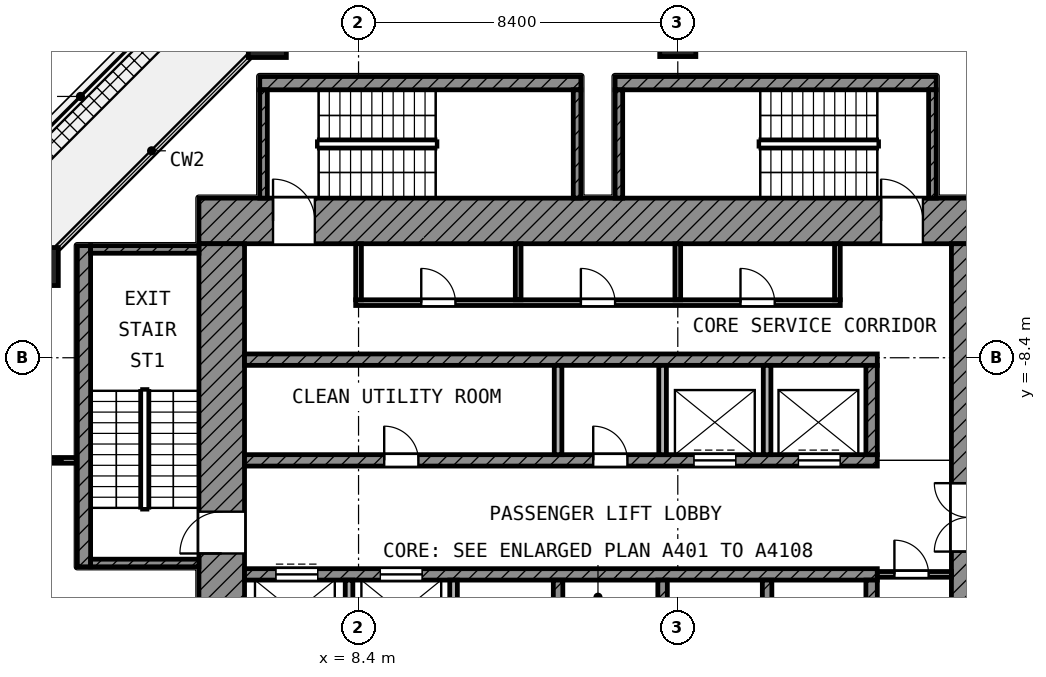
"""IFC4 building model, lengths in metres.
Left out: names, types, materials, properties, quantities, classifications, styles, units other than length and angle.
Written with IfcOpenShell. Run it as: python <this file> out.ifc"""

import sys

from ifc_helpers import new_model, si_unit, direction, frame, frame_2d, origin, origin_2d, place, context, subcontext, project, spatial, rectangle, extrude, element, fill, save


model = new_model("IFC4")
c1 = context("Model", 3, precision=1e-05, world=origin(), true_north=direction((0.0, 1.0)))
c2 = subcontext(c1, "Body", "Model", "MODEL_VIEW")
j1 = project(units=[si_unit("LENGTHUNIT", "METRE"), si_unit("PLANEANGLEUNIT", "RADIAN")], contexts=[c1])
p1 = place(None, origin())
s1 = spatial("IfcSite", under=j1, at=p1, CompositionType="ELEMENT")
p2 = place(p1, origin())
s2 = spatial("IfcBuilding", under=s1, at=p2, CompositionType="ELEMENT")
p3 = place(p2, frame((0.0, 0.0, 187.8)))
s3 = spatial("IfcBuildingStorey", under=s2, at=p3, CompositionType="ELEMENT", Elevation=187.8)
p4 = place(p3, frame((6.0, 0.0, 0.0), z_axis=(0.0, 0.0, 1.0), x_axis=(1.0, 0.0, 0.0)))
e1 = element("IfcColumn", 1, at=p4, inside=s3, PredefinedType="COLUMN", context=c2, shape_type="SweptSolid", body=[
    extrude(rectangle(XDim=1.0, YDim=1.0, at=origin_2d()), origin(), (0.0, 0.0, 1.0), 4.2),
])
p5 = place(p3, frame((16.8, 0.0, 0.0), z_axis=(0.0, 0.0, 1.0), x_axis=(1.0, 0.0, 0.0)))
e2 = element("IfcColumn", 2, at=p5, inside=s3, PredefinedType="COLUMN", context=c2, shape_type="SweptSolid", body=[
    extrude(rectangle(XDim=0.95, YDim=0.95, at=origin_2d()), origin(), (0.0, 0.0, 1.0), 4.2),
])
p6 = place(p3, frame((0.0, -6.0, 0.0), z_axis=(0.0, 0.0, 1.0), x_axis=(1.0, 0.0, 0.0)))
e3 = element("IfcColumn", 3, at=p6, inside=s3, PredefinedType="COLUMN", context=c2, shape_type="SweptSolid", body=[
    extrude(rectangle(XDim=1.0, YDim=1.0, at=origin_2d()), origin(), (0.0, 0.0, 1.0), 4.2),
])
p7 = place(p3, frame((4.2, -4.8, 0.0), z_axis=(0.0, 0.0, 1.0), x_axis=(1.0, 0.0, 0.0)))
e4 = element("IfcWall", 4, at=p7, inside=s3, PredefinedType="SHEAR", context=c2, shape_type="SweptSolid", body=[
    extrude(rectangle(XDim=20.7, YDim=1.2, at=frame_2d((10.35, 0.0))), origin(), (0.0, 0.0, 1.0), 3.6),
])
p8 = place(p7, frame((1.95, 0.0, 0.0)))
e5 = element("IfcOpeningElement", 5, at=p8, cuts=e4, PredefinedType="OPENING", context=c2, shape_type="SweptSolid", body=[
    extrude(rectangle(XDim=1.1, YDim=2.1, at=frame_2d((0.55, 1.05))), frame((0.0, 0.61, 0.0), z_axis=(0.0, -1.0, 0.0), x_axis=(1.0, 0.0, 0.0)), (0.0, 0.0, 1.0), 1.22),
])
p9 = place(p7, frame((17.95, 0.0, 0.0)))
e6 = element("IfcOpeningElement", 6, at=p9, cuts=e4, PredefinedType="OPENING", context=c2, shape_type="SweptSolid", body=[
    extrude(rectangle(XDim=1.1, YDim=2.1, at=frame_2d((0.55, 1.05))), frame((0.0, 0.61, 0.0), z_axis=(0.0, -1.0, 0.0), x_axis=(1.0, 0.0, 0.0)), (0.0, 0.0, 1.0), 1.22),
])
p10 = place(p3, frame((4.8, -24.9, 0.0), z_axis=(0.0, 0.0, 1.0), x_axis=(0.0, 1.0, 0.0)))
e7 = element("IfcWall", 7, at=p10, inside=s3, PredefinedType="SHEAR", context=c2, shape_type="SweptSolid", body=[
    extrude(rectangle(XDim=19.5, YDim=1.2, at=frame_2d((9.75, 0.0))), origin(), (0.0, 0.0, 1.0), 3.6),
])
p11 = place(p10, frame((11.35, 0.0, 0.0)))
e8 = element("IfcOpeningElement", 8, at=p11, cuts=e7, PredefinedType="OPENING", context=c2, shape_type="SweptSolid", body=[
    extrude(rectangle(XDim=1.1, YDim=2.1, at=frame_2d((0.55, 1.05))), frame((0.0, 0.61, 0.0), z_axis=(0.0, -1.0, 0.0), x_axis=(1.0, 0.0, 0.0)), (0.0, 0.0, 1.0), 1.22),
])
p12 = place(p10, frame((2.05, 0.0, 0.0)))
e9 = element("IfcOpeningElement", 9, at=p12, cuts=e7, PredefinedType="OPENING", context=c2, shape_type="SweptSolid", body=[
    extrude(rectangle(XDim=1.1, YDim=2.1, at=frame_2d((0.55, 1.05))), frame((0.0, 0.61, 0.0), z_axis=(0.0, -1.0, 0.0), x_axis=(1.0, 0.0, 0.0)), (0.0, 0.0, 1.0), 1.22),
])
p13 = place(p3, frame((24.45, -24.0, 0.0), z_axis=(0.0, 0.0, 1.0), x_axis=(0.0, 1.0, 0.0)))
e10 = element("IfcWall", 10, at=p13, inside=s3, PredefinedType="SHEAR", context=c2, shape_type="SweptSolid", body=[
    extrude(rectangle(XDim=18.6, YDim=0.9, at=frame_2d((9.3, 0.0))), origin(), (0.0, 0.0, 1.0), 3.6),
])
p14 = place(p13, frame((10.5, 0.0, 0.0)))
e11 = element("IfcOpeningElement", 11, at=p14, cuts=e10, PredefinedType="OPENING", context=c2, shape_type="SweptSolid", body=[
    extrude(rectangle(XDim=1.8, YDim=2.1, at=frame_2d((0.9, 1.05))), frame((0.0, 0.46, 0.0), z_axis=(0.0, -1.0, 0.0), x_axis=(1.0, 0.0, 0.0)), (0.0, 0.0, 1.0), 0.92),
])
p15 = place(p3, frame((5.4, -8.45, 0.0), z_axis=(0.0, 0.0, 1.0), x_axis=(1.0, 0.0, 0.0)))
e12 = element("IfcWall", 12, at=p15, inside=s3, PredefinedType="SHEAR", context=c2, shape_type="SweptSolid", body=[
    extrude(rectangle(XDim=16.65, YDim=0.3, at=frame_2d((8.325, 0.0))), origin(), (0.0, 0.0, 1.0), 3.6),
])
p16 = place(p3, frame((5.4, -11.1, 0.0), z_axis=(0.0, 0.0, 1.0), x_axis=(1.0, 0.0, 0.0)))
e13 = element("IfcWall", 13, at=p16, inside=s3, PredefinedType="SHEAR", context=c2, shape_type="SweptSolid", body=[
    extrude(rectangle(XDim=16.65, YDim=0.3, at=frame_2d((8.325, 0.0))), origin(), (0.0, 0.0, 1.0), 3.6),
])
p17 = place(p16, frame((11.825, 0.0, 0.0)))
e14 = element("IfcOpeningElement", 14, at=p17, cuts=e13, PredefinedType="OPENING", context=c2, shape_type="SweptSolid", body=[
    extrude(rectangle(XDim=1.1, YDim=2.1, at=frame_2d((0.55, 1.05))), frame((0.0, 0.16, 0.0), z_axis=(0.0, -1.0, 0.0), x_axis=(1.0, 0.0, 0.0)), (0.0, 0.0, 1.0), 0.32),
])
p18 = place(p16, frame((14.575, 0.0, 0.0)))
e15 = element("IfcOpeningElement", 15, at=p18, cuts=e13, PredefinedType="OPENING", context=c2, shape_type="SweptSolid", body=[
    extrude(rectangle(XDim=1.1, YDim=2.1, at=frame_2d((0.55, 1.05))), frame((0.0, 0.16, 0.0), z_axis=(0.0, -1.0, 0.0), x_axis=(1.0, 0.0, 0.0)), (0.0, 0.0, 1.0), 0.32),
])
p19 = place(p16, frame((3.675, 0.0, 0.0)))
e16 = element("IfcOpeningElement", 16, at=p19, cuts=e13, PredefinedType="OPENING", context=c2, shape_type="SweptSolid", body=[
    extrude(rectangle(XDim=0.9, YDim=2.1, at=frame_2d((0.45, 1.05))), frame((0.0, 0.16, 0.0), z_axis=(0.0, -1.0, 0.0), x_axis=(1.0, 0.0, 0.0)), (0.0, 0.0, 1.0), 0.32),
])
p20 = place(p16, frame((9.175, 0.0, 0.0)))
e17 = element("IfcOpeningElement", 17, at=p20, cuts=e13, PredefinedType="OPENING", context=c2, shape_type="SweptSolid", body=[
    extrude(rectangle(XDim=0.9, YDim=2.1, at=frame_2d((0.45, 1.05))), frame((0.0, 0.16, 0.0), z_axis=(0.0, -1.0, 0.0), x_axis=(1.0, 0.0, 0.0)), (0.0, 0.0, 1.0), 0.32),
])
p21 = place(p3, frame((5.4, -14.1, 0.0), z_axis=(0.0, 0.0, 1.0), x_axis=(1.0, 0.0, 0.0)))
e18 = element("IfcWall", 18, at=p21, inside=s3, PredefinedType="SHEAR", context=c2, shape_type="SweptSolid", body=[
    extrude(rectangle(XDim=16.65, YDim=0.3, at=frame_2d((8.325, 0.0))), origin(), (0.0, 0.0, 1.0), 3.6),
])
p22 = place(p21, frame((0.825, 0.0, 0.0)))
e19 = element("IfcOpeningElement", 19, at=p22, cuts=e18, PredefinedType="OPENING", context=c2, shape_type="SweptSolid", body=[
    extrude(rectangle(XDim=1.1, YDim=2.1, at=frame_2d((0.55, 1.05))), frame((0.0, 0.16, 0.0), z_axis=(0.0, -1.0, 0.0), x_axis=(1.0, 0.0, 0.0)), (0.0, 0.0, 1.0), 0.32),
])
p23 = place(p21, frame((3.575, 0.0, 0.0)))
e20 = element("IfcOpeningElement", 20, at=p23, cuts=e18, PredefinedType="OPENING", context=c2, shape_type="SweptSolid", body=[
    extrude(rectangle(XDim=1.1, YDim=2.1, at=frame_2d((0.55, 1.05))), frame((0.0, 0.16, 0.0), z_axis=(0.0, -1.0, 0.0), x_axis=(1.0, 0.0, 0.0)), (0.0, 0.0, 1.0), 0.32),
])
p24 = place(p3, frame((21.9, -10.95, 0.0), z_axis=(0.0, 0.0, 1.0), x_axis=(0.0, 1.0, 0.0)))
e21 = element("IfcWall", 21, at=p24, inside=s3, PredefinedType="SHEAR", context=c2, shape_type="SweptSolid", body=[
    extrude(rectangle(XDim=2.35, YDim=0.3, at=frame_2d((1.175, 0.0))), origin(), (0.0, 0.0, 1.0), 3.6),
])
p25 = place(p3, frame((21.9, -16.6, 0.0), z_axis=(0.0, 0.0, 1.0), x_axis=(0.0, 1.0, 0.0)))
e22 = element("IfcWall", 22, at=p25, inside=s3, PredefinedType="SHEAR", context=c2, shape_type="SweptSolid", body=[
    extrude(rectangle(XDim=2.35, YDim=0.3, at=frame_2d((1.175, 0.0))), origin(), (0.0, 0.0, 1.0), 3.6),
])
for number, where, z_axis, x_axis in (
    (23, (13.65, -10.95, 0.0), (0.0, 0.0, 1.0), (0.0, 1.0, 0.0)),
    (24, (16.4, -10.95, 0.0), (0.0, 0.0, 1.0), (0.0, 1.0, 0.0)),
    (25, (19.15, -10.95, 0.0), (0.0, 0.0, 1.0), (0.0, 1.0, 0.0)),
):
    element("IfcWall", number, at=place(p3, frame(where, z_axis=z_axis, x_axis=x_axis)), inside=s3, PredefinedType="PARTITIONING", context=c2, shape_type="SweptSolid", body=[
        extrude(rectangle(XDim=2.35, YDim=0.2, at=frame_2d((1.175, 0.0))), origin(), (0.0, 0.0, 1.0), 3.6),
    ])
for number, where, z_axis, x_axis in (
    (26, (8.15, -16.6, 0.0), (0.0, 0.0, 1.0), (0.0, 1.0, 0.0)),
    (27, (10.9, -16.6, 0.0), (0.0, 0.0, 1.0), (0.0, 1.0, 0.0)),
):
    element("IfcWall", number, at=place(p3, frame(where, z_axis=z_axis, x_axis=x_axis)), inside=s3, PredefinedType="PARTITIONING", context=c2, shape_type="SweptSolid", body=[
        extrude(rectangle(XDim=2.35, YDim=0.2, at=frame_2d((1.175, 0.0))), origin(), (0.0, 0.0, 1.0), 3.6),
    ])
for number, where, z_axis, x_axis in (
    (28, (13.65, -16.6, 0.0), (0.0, 0.0, 1.0), (0.0, 1.0, 0.0)),
    (29, (16.4, -16.6, 0.0), (0.0, 0.0, 1.0), (0.0, 1.0, 0.0)),
    (30, (19.15, -16.6, 0.0), (0.0, 0.0, 1.0), (0.0, 1.0, 0.0)),
):
    element("IfcWall", number, at=place(p3, frame(where, z_axis=z_axis, x_axis=x_axis)), inside=s3, PredefinedType="SHEAR", context=c2, shape_type="SweptSolid", body=[
        extrude(rectangle(XDim=2.35, YDim=0.25, at=frame_2d((1.175, 0.0))), origin(), (0.0, 0.0, 1.0), 3.6),
    ])
p26 = place(p3, frame((22.05, -14.1, 0.0), z_axis=(0.0, 0.0, 1.0), x_axis=(1.0, 0.0, 0.0)))
e31 = element("IfcWall", 31, at=p26, inside=s3, PredefinedType="PARTITIONING", context=c2, shape_type="SweptSolid", body=[
    extrude(rectangle(XDim=1.95, YDim=0.15, at=frame_2d((0.975, 0.0))), origin(), (0.0, 0.0, 1.0), 3.6),
])
p27 = place(p26, frame((0.45, 0.0, 0.0)))
e32 = element("IfcOpeningElement", 32, at=p27, cuts=e31, PredefinedType="OPENING", context=c2, shape_type="SweptSolid", body=[
    extrude(rectangle(XDim=0.9, YDim=2.1, at=frame_2d((0.45, 1.05))), frame((0.0, 0.085, 0.0), z_axis=(0.0, -1.0, 0.0), x_axis=(1.0, 0.0, 0.0)), (0.0, 0.0, 1.0), 0.17),
])
p28 = place(p3, frame((8.325, -6.95, 0.0), z_axis=(0.0, 0.0, 1.0), x_axis=(1.0, 0.0, 0.0)))
e33 = element("IfcWall", 33, at=p28, inside=s3, PredefinedType="PARTITIONING", context=c2, shape_type="SweptSolid", body=[
    extrude(rectangle(XDim=12.75, YDim=0.15, at=frame_2d((6.375, 0.0))), origin(), (0.0, 0.0, 1.0), 3.6),
])
p29 = place(p28, frame((1.725, 0.0, 0.0)))
e34 = element("IfcOpeningElement", 34, at=p29, cuts=e33, PredefinedType="OPENING", context=c2, shape_type="SweptSolid", body=[
    extrude(rectangle(XDim=0.9, YDim=2.1, at=frame_2d((0.45, 1.05))), frame((0.0, 0.085, 0.0), z_axis=(0.0, -1.0, 0.0), x_axis=(1.0, 0.0, 0.0)), (0.0, 0.0, 1.0), 0.17),
])
p30 = place(p28, frame((5.925, 0.0, 0.0)))
e35 = element("IfcOpeningElement", 35, at=p30, cuts=e33, PredefinedType="OPENING", context=c2, shape_type="SweptSolid", body=[
    extrude(rectangle(XDim=0.9, YDim=2.1, at=frame_2d((0.45, 1.05))), frame((0.0, 0.085, 0.0), z_axis=(0.0, -1.0, 0.0), x_axis=(1.0, 0.0, 0.0)), (0.0, 0.0, 1.0), 0.17),
])
p31 = place(p28, frame((10.125, 0.0, 0.0)))
e36 = element("IfcOpeningElement", 36, at=p31, cuts=e33, PredefinedType="OPENING", context=c2, shape_type="SweptSolid", body=[
    extrude(rectangle(XDim=0.9, YDim=2.1, at=frame_2d((0.45, 1.05))), frame((0.0, 0.085, 0.0), z_axis=(0.0, -1.0, 0.0), x_axis=(1.0, 0.0, 0.0)), (0.0, 0.0, 1.0), 0.17),
])
for number, where, z_axis, x_axis in (
    (37, (8.4, -6.875, 0.0), (0.0, 0.0, 1.0), (0.0, 1.0, 0.0)),
    (38, (12.6, -6.875, 0.0), (0.0, 0.0, 1.0), (0.0, 1.0, 0.0)),
    (39, (16.8, -6.875, 0.0), (0.0, 0.0, 1.0), (0.0, 1.0, 0.0)),
    (40, (21.0, -6.875, 0.0), (0.0, 0.0, 1.0), (0.0, 1.0, 0.0)),
):
    element("IfcWall", number, at=place(p3, frame(where, z_axis=z_axis, x_axis=x_axis)), inside=s3, PredefinedType="PARTITIONING", context=c2, shape_type="SweptSolid", body=[
        extrude(rectangle(XDim=1.475, YDim=0.15, at=frame_2d((0.738, 0.0))), origin(), (0.0, 0.0, 1.0), 3.6),
    ])
p32 = place(p3, frame((1.175, -13.9, 0.0), z_axis=(0.0, 0.0, 1.0), x_axis=(0.0, 1.0, 0.0)))
e41 = element("IfcWall", 41, at=p32, inside=s3, PredefinedType="SHEAR", context=c2, shape_type="SweptSolid", body=[
    extrude(rectangle(XDim=8.45, YDim=0.35, at=frame_2d((4.225, 0.0))), origin(), (0.0, 0.0, 1.0), 3.6),
])
for number, where, z_axis, x_axis in (
    (42, (1.35, -5.55, 0.0), (0.0, 0.0, 1.0), (1.0, 0.0, 0.0)),
    (43, (1.35, -13.8, 0.0), (0.0, 0.0, 1.0), (1.0, 0.0, 0.0)),
):
    element("IfcWall", number, at=place(p3, frame(where, z_axis=z_axis, x_axis=x_axis)), inside=s3, PredefinedType="SHEAR", context=c2, shape_type="SweptSolid", body=[
        extrude(rectangle(XDim=2.85, YDim=0.2, at=frame_2d((1.425, 0.0))), origin(), (0.0, 0.0, 1.0), 3.6),
    ])
p33 = place(p3, frame((5.8, -1.175, 0.0), z_axis=(0.0, 0.0, 1.0), x_axis=(1.0, 0.0, 0.0)))
e44 = element("IfcWall", 44, at=p33, inside=s3, PredefinedType="SHEAR", context=c2, shape_type="SweptSolid", body=[
    extrude(rectangle(XDim=8.45, YDim=0.35, at=frame_2d((4.225, 0.0))), origin(), (0.0, 0.0, 1.0), 3.6),
])
for number, where, z_axis, x_axis in (
    (45, (5.9, -4.2, 0.0), (0.0, 0.0, 1.0), (0.0, 1.0, 0.0)),
    (46, (14.15, -4.2, 0.0), (0.0, 0.0, 1.0), (0.0, 1.0, 0.0)),
):
    element("IfcWall", number, at=place(p3, frame(where, z_axis=z_axis, x_axis=x_axis)), inside=s3, PredefinedType="SHEAR", context=c2, shape_type="SweptSolid", body=[
        extrude(rectangle(XDim=2.85, YDim=0.2, at=frame_2d((1.425, 0.0))), origin(), (0.0, 0.0, 1.0), 3.6),
    ])
p34 = place(p3, frame((15.15, -1.175, 0.0), z_axis=(0.0, 0.0, 1.0), x_axis=(1.0, 0.0, 0.0)))
e47 = element("IfcWall", 47, at=p34, inside=s3, PredefinedType="SHEAR", context=c2, shape_type="SweptSolid", body=[
    extrude(rectangle(XDim=8.45, YDim=0.35, at=frame_2d((4.225, 0.0))), origin(), (0.0, 0.0, 1.0), 3.6),
])
for number, where, z_axis, x_axis in (
    (48, (15.25, -4.2, 0.0), (0.0, 0.0, 1.0), (0.0, 1.0, 0.0)),
    (49, (23.5, -4.2, 0.0), (0.0, 0.0, 1.0), (0.0, 1.0, 0.0)),
):
    element("IfcWall", number, at=place(p3, frame(where, z_axis=z_axis, x_axis=x_axis)), inside=s3, PredefinedType="SHEAR", context=c2, shape_type="SweptSolid", body=[
        extrude(rectangle(XDim=2.85, YDim=0.2, at=frame_2d((1.425, 0.0))), origin(), (0.0, 0.0, 1.0), 3.6),
    ])
p35 = place(p3, frame((0.08, -11.1, 0.0), z_axis=(0.0, 0.0, 1.0), x_axis=(1.0, 0.0, 0.0)))
e50 = element("IfcWall", 50, at=p35, inside=s3, PredefinedType="PARTITIONING", context=c2, shape_type="SweptSolid", body=[
    extrude(rectangle(XDim=0.89, YDim=0.15, at=frame_2d((0.445, 0.0))), origin(), (0.0, 0.0, 1.0), 3.6),
])
p36 = place(p17, origin())
e51 = element("IfcDoor", 51, at=p36, inside=s3, OperationType="DOUBLE_DOOR_SLIDING", PredefinedType="DOOR", context=c2, shape_type="SweptSolid", body=[
    extrude(rectangle(XDim=1.1, YDim=2.1, at=frame_2d((0.55, 1.05))), frame((0.0, 0.025, 0.0), z_axis=(0.0, -1.0, 0.0), x_axis=(1.0, 0.0, 0.0)), (0.0, 0.0, 1.0), 0.05),
])
fill(e14, e51)
p37 = place(p18, origin())
e52 = element("IfcDoor", 52, at=p37, inside=s3, OperationType="DOUBLE_DOOR_SLIDING", PredefinedType="DOOR", context=c2, shape_type="SweptSolid", body=[
    extrude(rectangle(XDim=1.1, YDim=2.1, at=frame_2d((0.55, 1.05))), frame((0.0, 0.025, 0.0), z_axis=(0.0, -1.0, 0.0), x_axis=(1.0, 0.0, 0.0)), (0.0, 0.0, 1.0), 0.05),
])
fill(e15, e52)
p38 = place(p22, origin())
e53 = element("IfcDoor", 53, at=p38, inside=s3, OperationType="DOUBLE_DOOR_SLIDING", PredefinedType="DOOR", context=c2, shape_type="SweptSolid", body=[
    extrude(rectangle(XDim=1.1, YDim=2.1, at=frame_2d((0.55, 1.05))), frame((0.0, 0.025, 0.0), z_axis=(0.0, -1.0, 0.0), x_axis=(1.0, 0.0, 0.0)), (0.0, 0.0, 1.0), 0.05),
])
fill(e19, e53)
p39 = place(p23, origin())
e54 = element("IfcDoor", 54, at=p39, inside=s3, OperationType="DOUBLE_DOOR_SLIDING", PredefinedType="DOOR", context=c2, shape_type="SweptSolid", body=[
    extrude(rectangle(XDim=1.1, YDim=2.1, at=frame_2d((0.55, 1.05))), frame((0.0, 0.025, 0.0), z_axis=(0.0, -1.0, 0.0), x_axis=(1.0, 0.0, 0.0)), (0.0, 0.0, 1.0), 0.05),
])
fill(e20, e54)
p40 = place(p11, origin())
e55 = element("IfcDoor", 55, at=p40, inside=s3, OperationType="SINGLE_SWING_LEFT", PredefinedType="DOOR", context=c2, shape_type="SweptSolid", body=[
    extrude(rectangle(XDim=1.1, YDim=2.1, at=frame_2d((0.55, 1.05))), frame((0.0, 0.025, 0.0), z_axis=(0.0, -1.0, 0.0), x_axis=(1.0, 0.0, 0.0)), (0.0, 0.0, 1.0), 0.05),
])
fill(e8, e55)
p41 = place(p8, origin())
e56 = element("IfcDoor", 56, at=p41, inside=s3, OperationType="SINGLE_SWING_LEFT", PredefinedType="DOOR", context=c2, shape_type="SweptSolid", body=[
    extrude(rectangle(XDim=1.1, YDim=2.1, at=frame_2d((0.55, 1.05))), frame((0.0, 0.025, 0.0), z_axis=(0.0, -1.0, 0.0), x_axis=(1.0, 0.0, 0.0)), (0.0, 0.0, 1.0), 0.05),
])
fill(e5, e56)
p42 = place(p9, origin())
e57 = element("IfcDoor", 57, at=p42, inside=s3, OperationType="SINGLE_SWING_LEFT", PredefinedType="DOOR", context=c2, shape_type="SweptSolid", body=[
    extrude(rectangle(XDim=1.1, YDim=2.1, at=frame_2d((0.55, 1.05))), frame((0.0, 0.025, 0.0), z_axis=(0.0, -1.0, 0.0), x_axis=(1.0, 0.0, 0.0)), (0.0, 0.0, 1.0), 0.05),
])
fill(e6, e57)
p43 = place(p29, origin())
e58 = element("IfcDoor", 58, at=p43, inside=s3, OperationType="SINGLE_SWING_LEFT", PredefinedType="DOOR", context=c2, shape_type="SweptSolid", body=[
    extrude(rectangle(XDim=0.9, YDim=2.1, at=frame_2d((0.45, 1.05))), frame((0.0, 0.025, 0.0), z_axis=(0.0, -1.0, 0.0), x_axis=(1.0, 0.0, 0.0)), (0.0, 0.0, 1.0), 0.05),
])
fill(e34, e58)
p44 = place(p30, origin())
e59 = element("IfcDoor", 59, at=p44, inside=s3, OperationType="SINGLE_SWING_LEFT", PredefinedType="DOOR", context=c2, shape_type="SweptSolid", body=[
    extrude(rectangle(XDim=0.9, YDim=2.1, at=frame_2d((0.45, 1.05))), frame((0.0, 0.025, 0.0), z_axis=(0.0, -1.0, 0.0), x_axis=(1.0, 0.0, 0.0)), (0.0, 0.0, 1.0), 0.05),
])
fill(e35, e59)
p45 = place(p31, origin())
e60 = element("IfcDoor", 60, at=p45, inside=s3, OperationType="SINGLE_SWING_LEFT", PredefinedType="DOOR", context=c2, shape_type="SweptSolid", body=[
    extrude(rectangle(XDim=0.9, YDim=2.1, at=frame_2d((0.45, 1.05))), frame((0.0, 0.025, 0.0), z_axis=(0.0, -1.0, 0.0), x_axis=(1.0, 0.0, 0.0)), (0.0, 0.0, 1.0), 0.05),
])
fill(e36, e60)
p46 = place(p27, origin())
e61 = element("IfcDoor", 61, at=p46, inside=s3, OperationType="SINGLE_SWING_LEFT", PredefinedType="DOOR", context=c2, shape_type="SweptSolid", body=[
    extrude(rectangle(XDim=0.9, YDim=2.1, at=frame_2d((0.45, 1.05))), frame((0.0, 0.025, 0.0), z_axis=(0.0, -1.0, 0.0), x_axis=(1.0, 0.0, 0.0)), (0.0, 0.0, 1.0), 0.05),
])
fill(e32, e61)
p47 = place(p19, origin())
e62 = element("IfcDoor", 62, at=p47, inside=s3, OperationType="SINGLE_SWING_LEFT", PredefinedType="DOOR", context=c2, shape_type="SweptSolid", body=[
    extrude(rectangle(XDim=0.9, YDim=2.1, at=frame_2d((0.45, 1.05))), frame((0.0, 0.025, 0.0), z_axis=(0.0, -1.0, 0.0), x_axis=(1.0, 0.0, 0.0)), (0.0, 0.0, 1.0), 0.05),
])
fill(e16, e62)
p48 = place(p20, origin())
e63 = element("IfcDoor", 63, at=p48, inside=s3, OperationType="SINGLE_SWING_LEFT", PredefinedType="DOOR", context=c2, shape_type="SweptSolid", body=[
    extrude(rectangle(XDim=0.9, YDim=2.1, at=frame_2d((0.45, 1.05))), frame((0.0, 0.025, 0.0), z_axis=(0.0, -1.0, 0.0), x_axis=(1.0, 0.0, 0.0)), (0.0, 0.0, 1.0), 0.05),
])
fill(e17, e63)
save(model, sys.argv[1])
